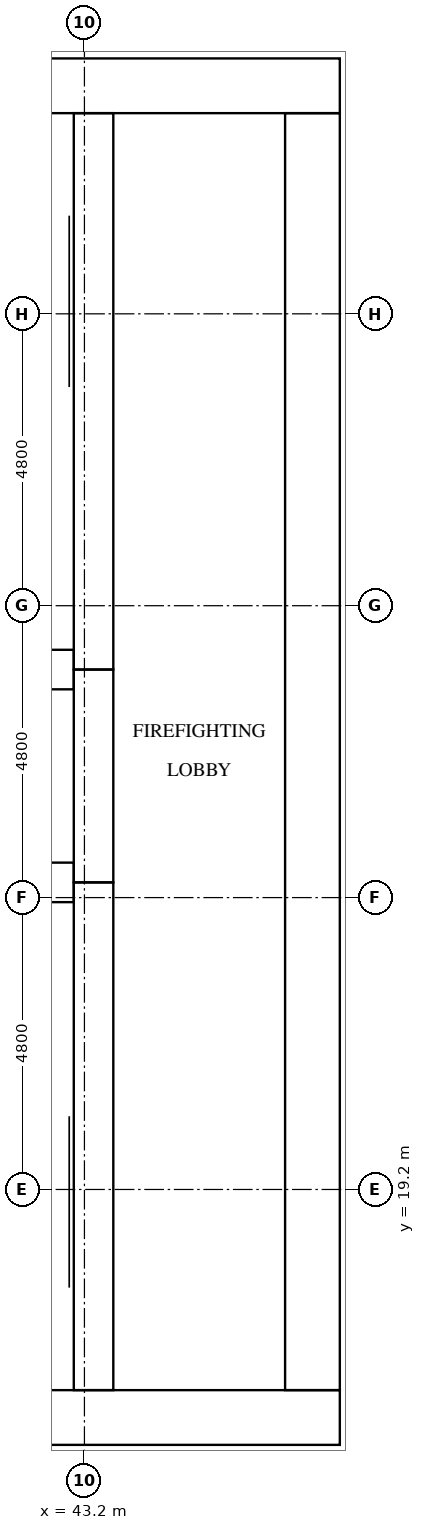
"""IFC4 building model, lengths in metres.
Left out: names, types, materials, properties, quantities, classifications, styles, units other than length and angle.
Written with IfcOpenShell. Run it as: python <this file> out.ifc"""

import sys

from ifc_helpers import new_model, si_unit, direction, frame, frame_2d, origin, place, context, subcontext, project, spatial, rectangle, extrude, element, fill, save


model = new_model("IFC4")
c1 = context("Model", 3, precision=1e-05, world=origin(), true_north=direction((0.0, 1.0)))
c2 = subcontext(c1, "Body", "Model", "MODEL_VIEW")
j1 = project(units=[si_unit("LENGTHUNIT", "METRE"), si_unit("PLANEANGLEUNIT", "RADIAN")], contexts=[c1])
p1 = place(None, origin())
s1 = spatial("IfcSite", under=j1, at=p1, CompositionType="ELEMENT")
p2 = place(p1, origin())
s2 = spatial("IfcBuilding", under=s1, at=p2, CompositionType="ELEMENT")
p3 = place(p2, frame((0.0, 0.0, 59.3)))
s3 = spatial("IfcBuildingStorey", under=s2, at=p3, CompositionType="ELEMENT", Elevation=59.3)
p4 = place(p3, frame((15.0, 15.45, 0.0), z_axis=(0.0, 0.0, 1.0), x_axis=(1.0, 0.0, 0.0)))
e1 = element("IfcWall", 1, at=p4, inside=s3, PredefinedType="SHEAR", context=c2, shape_type="SweptSolid", body=[
    extrude(rectangle(XDim=32.4, YDim=0.9, at=frame_2d((16.2, 0.0))), origin(), (0.0, 0.0, 1.0), 3.2),
])
p5 = place(p4, frame((15.3, 0.0, 0.0)))
e2 = element("IfcOpeningElement", 2, at=p5, cuts=e1, PredefinedType="OPENING", context=c2, shape_type="SweptSolid", body=[
    extrude(rectangle(XDim=1.8, YDim=2.1, at=frame_2d((0.9, 1.05))), frame((0.0, 0.46, 0.0), z_axis=(0.0, -1.0, 0.0), x_axis=(1.0, 0.0, 0.0)), (0.0, 0.0, 1.0), 0.92),
])
p6 = place(p3, frame((15.0, 37.35, 0.0), z_axis=(0.0, 0.0, 1.0), x_axis=(1.0, 0.0, 0.0)))
e3 = element("IfcWall", 3, at=p6, inside=s3, PredefinedType="SHEAR", context=c2, shape_type="SweptSolid", body=[
    extrude(rectangle(XDim=32.4, YDim=0.9, at=frame_2d((16.2, 0.0))), origin(), (0.0, 0.0, 1.0), 3.2),
])
p7 = place(p6, frame((15.3, 0.0, 0.0)))
e4 = element("IfcOpeningElement", 4, at=p7, cuts=e3, PredefinedType="OPENING", context=c2, shape_type="SweptSolid", body=[
    extrude(rectangle(XDim=1.8, YDim=2.1, at=frame_2d((0.9, 1.05))), frame((0.0, 0.46, 0.0), z_axis=(0.0, -1.0, 0.0), x_axis=(1.0, 0.0, 0.0)), (0.0, 0.0, 1.0), 0.92),
])
p8 = place(p6, frame((1.794, 0.0, 0.0)))
e5 = element("IfcOpeningElement", 5, at=p8, cuts=e3, PredefinedType="OPENING", context=c2, shape_type="SweptSolid", body=[
    extrude(rectangle(XDim=1.0, YDim=2.1, at=frame_2d((0.5, 1.05))), frame((0.0, 0.46, 0.0), z_axis=(0.0, -1.0, 0.0), x_axis=(1.0, 0.0, 0.0)), (0.0, 0.0, 1.0), 0.92),
])
p9 = place(p6, frame((5.331, 0.0, 0.0)))
e6 = element("IfcOpeningElement", 6, at=p9, cuts=e3, PredefinedType="OPENING", context=c2, shape_type="SweptSolid", body=[
    extrude(rectangle(XDim=1.0, YDim=2.1, at=frame_2d((0.5, 1.05))), frame((0.0, 0.46, 0.0), z_axis=(0.0, -1.0, 0.0), x_axis=(1.0, 0.0, 0.0)), (0.0, 0.0, 1.0), 0.92),
])
p10 = place(p3, frame((46.95, 15.9, 0.0), z_axis=(0.0, 0.0, 1.0), x_axis=(0.0, 1.0, 0.0)))
e7 = element("IfcWall", 7, at=p10, inside=s3, PredefinedType="SHEAR", context=c2, shape_type="SweptSolid", body=[
    extrude(rectangle(XDim=21.0, YDim=0.9, at=frame_2d((10.5, 0.0))), origin(), (0.0, 0.0, 1.0), 3.2),
])
p11 = place(p10, frame((10.2, 0.0, 0.0)))
e8 = element("IfcOpeningElement", 8, at=p11, cuts=e7, PredefinedType="OPENING", context=c2, shape_type="SweptSolid", body=[
    extrude(rectangle(XDim=1.2, YDim=2.1, at=frame_2d((0.6, 1.05))), frame((0.0, 0.46, 0.0), z_axis=(0.0, -1.0, 0.0), x_axis=(1.0, 0.0, 0.0)), (0.0, 0.0, 1.0), 0.92),
])
p12 = place(p3, frame((43.35, 15.9, 0.0), z_axis=(0.0, 0.0, 1.0), x_axis=(0.0, 1.0, 0.0)))
e9 = element("IfcWall", 9, at=p12, inside=s3, PredefinedType="SHEAR", context=c2, shape_type="SweptSolid", body=[
    extrude(rectangle(XDim=8.35, YDim=0.65, at=frame_2d((4.175, 0.0))), origin(), (0.0, 0.0, 1.0), 3.2),
])
p13 = place(p12, frame((0.3, 0.0, 0.0)))
e10 = element("IfcOpeningElement", 10, at=p13, cuts=e9, PredefinedType="OPENING", context=c2, shape_type="SweptSolid", body=[
    extrude(rectangle(XDim=1.2, YDim=2.1, at=frame_2d((0.6, 1.05))), frame((0.0, 0.335, 0.0), z_axis=(0.0, -1.0, 0.0), x_axis=(1.0, 0.0, 0.0)), (0.0, 0.0, 1.0), 0.67),
])
p14 = place(p3, frame((43.35, 24.25, 0.0), z_axis=(0.0, 0.0, 1.0), x_axis=(0.0, 1.0, 0.0)))
e11 = element("IfcWall", 11, at=p14, inside=s3, PredefinedType="SHEAR", context=c2, shape_type="SweptSolid", body=[
    extrude(rectangle(XDim=3.5, YDim=0.65, at=frame_2d((1.75, 0.0))), origin(), (0.0, 0.0, 1.0), 3.2),
])
p15 = place(p14, frame((1.2, 0.0, 0.0)))
e12 = element("IfcOpeningElement", 12, at=p15, cuts=e11, PredefinedType="OPENING", context=c2, shape_type="SweptSolid", body=[
    extrude(rectangle(XDim=1.1, YDim=2.1, at=frame_2d((0.55, 1.05))), frame((0.0, 0.335, 0.0), z_axis=(0.0, -1.0, 0.0), x_axis=(1.0, 0.0, 0.0)), (0.0, 0.0, 1.0), 0.67),
])
p16 = place(p3, frame((43.35, 27.75, 0.0), z_axis=(0.0, 0.0, 1.0), x_axis=(0.0, 1.0, 0.0)))
e13 = element("IfcWall", 13, at=p16, inside=s3, PredefinedType="SHEAR", context=c2, shape_type="SweptSolid", body=[
    extrude(rectangle(XDim=9.15, YDim=0.65, at=frame_2d((4.575, 0.0))), origin(), (0.0, 0.0, 1.0), 3.2),
])
p17 = place(p16, frame((7.65, 0.0, 0.0)))
e14 = element("IfcOpeningElement", 14, at=p17, cuts=e13, PredefinedType="OPENING", context=c2, shape_type="SweptSolid", body=[
    extrude(rectangle(XDim=1.2, YDim=2.1, at=frame_2d((0.6, 1.05))), frame((0.0, 0.335, 0.0), z_axis=(0.0, -1.0, 0.0), x_axis=(1.0, 0.0, 0.0)), (0.0, 0.0, 1.0), 0.67),
])
for number, where, z_axis, x_axis in (
    (15, (39.625, 24.25, 0.0), (0.0, 0.0, 1.0), (1.0, 0.0, 0.0)),
    (16, (39.625, 27.75, 0.0), (0.0, 0.0, 1.0), (1.0, 0.0, 0.0)),
):
    element("IfcWall", number, at=place(p3, frame(where, z_axis=z_axis, x_axis=x_axis)), inside=s3, PredefinedType="SHEAR", context=c2, shape_type="SweptSolid", body=[
        extrude(rectangle(XDim=3.4, YDim=0.65, at=frame_2d((1.7, 0.0))), origin(), (0.0, 0.0, 1.0), 3.2),
    ])
p18 = place(p15, origin())
e17 = element("IfcDoor", 17, at=p18, inside=s3, OperationType="DOUBLE_DOOR_SLIDING", PredefinedType="DOOR", context=c2, shape_type="SweptSolid", body=[
    extrude(rectangle(XDim=1.1, YDim=2.1, at=frame_2d((0.55, 1.05))), frame((0.0, 0.025, 0.0), z_axis=(0.0, -1.0, 0.0), x_axis=(1.0, 0.0, 0.0)), (0.0, 0.0, 1.0), 0.05),
])
fill(e12, e17)
p19 = place(p13, origin())
e18 = element("IfcDoor", 18, at=p19, inside=s3, OperationType="SINGLE_SWING_LEFT", PredefinedType="DOOR", context=c2, shape_type="SweptSolid", body=[
    extrude(rectangle(XDim=1.2, YDim=2.1, at=frame_2d((0.6, 1.05))), frame((0.0, 0.025, 0.0), z_axis=(0.0, -1.0, 0.0), x_axis=(1.0, 0.0, 0.0)), (0.0, 0.0, 1.0), 0.05),
])
fill(e10, e18)
p20 = place(p17, origin())
e19 = element("IfcDoor", 19, at=p20, inside=s3, OperationType="SINGLE_SWING_RIGHT", PredefinedType="DOOR", context=c2, shape_type="SweptSolid", body=[
    extrude(rectangle(XDim=1.2, YDim=2.1, at=frame_2d((0.6, 1.05))), frame((0.0, 0.025, 0.0), z_axis=(0.0, -1.0, 0.0), x_axis=(1.0, 0.0, 0.0)), (0.0, 0.0, 1.0), 0.05),
])
fill(e14, e19)
p21 = place(p11, origin())
e20 = element("IfcDoor", 20, at=p21, inside=s3, OperationType="SINGLE_SWING_RIGHT", PredefinedType="DOOR", context=c2, shape_type="SweptSolid", body=[
    extrude(rectangle(XDim=1.2, YDim=2.1, at=frame_2d((0.6, 1.05))), frame((0.0, 0.025, 0.0), z_axis=(0.0, -1.0, 0.0), x_axis=(1.0, 0.0, 0.0)), (0.0, 0.0, 1.0), 0.05),
])
fill(e8, e20)
save(model, sys.argv[1])
